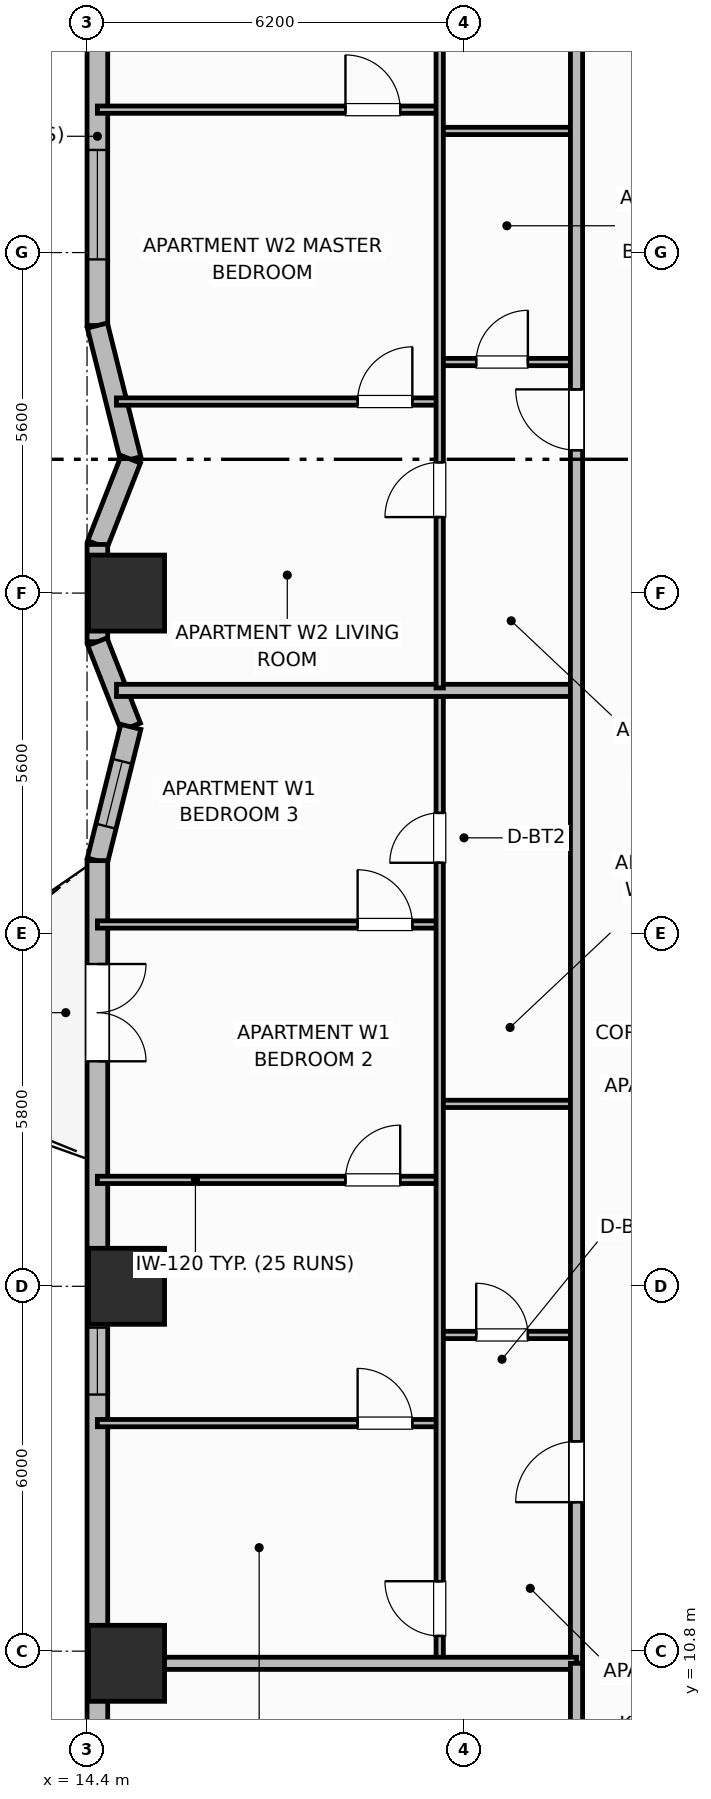
"""IFC4 building model, lengths in metres.
Left out: names, types, materials, properties, quantities, classifications, styles, units other than length and angle.
Written with IfcOpenShell. Run it as: python <this file> out.ifc"""

import sys

from ifc_helpers import new_model, si_unit, direction, frame, frame_2d, origin, origin_2d, place, context, subcontext, project, spatial, rectangle, extrude, element, fill, save


model = new_model("IFC4")
c1 = context("Model", 3, precision=1e-05, world=origin(), true_north=direction((0.0, 1.0)))
c2 = subcontext(c1, "Body", "Model", "MODEL_VIEW")
j1 = project(units=[si_unit("LENGTHUNIT", "METRE"), si_unit("PLANEANGLEUNIT", "RADIAN")], contexts=[c1])
p1 = place(None, origin())
s1 = spatial("IfcSite", under=j1, at=p1, CompositionType="ELEMENT")
p2 = place(p1, origin())
s2 = spatial("IfcBuilding", under=s1, at=p2, CompositionType="ELEMENT")
p3 = place(p2, frame((0.0, 0.0, 28.8)))
s3 = spatial("IfcBuildingStorey", under=s2, at=p3, CompositionType="ELEMENT", Elevation=28.8)
for number, where, z_axis, x_axis in (
    (1, (15.05, 10.6, 0.0), (0.0, 0.0, 1.0), (1.0, 0.0, 0.0)),
    (2, (15.05, 16.8, 0.0), (0.0, 0.0, 1.0), (1.0, 0.0, 0.0)),
    (3, (15.05, 28.2, 0.0), (0.0, 0.0, 1.0), (1.0, 0.0, 0.0)),
):
    element("IfcColumn", number, at=place(p3, frame(where, z_axis=z_axis, x_axis=x_axis)), inside=s3, PredefinedType="COLUMN", context=c2, shape_type="SweptSolid", body=[
        extrude(rectangle(XDim=1.25, YDim=1.25, at=origin_2d()), origin(), (0.0, 0.0, 1.0), 3.7),
    ])
p4 = place(p3, frame((14.57, 47.4, 0.0), z_axis=(0.0, 0.0, 1.0), x_axis=(0.0, -1.0, 0.0)))
e4 = element("IfcWall", 4, at=p4, inside=s3, PredefinedType="SOLIDWALL", context=c2, shape_type="SweptSolid", body=[
    extrude(rectangle(XDim=14.8, YDim=0.34, at=frame_2d((7.4, 0.0))), origin(), (0.0, 0.0, 1.0), 2.7),
])
p5 = place(p4, frame((3.762, 0.0, 0.73)))
e5 = element("IfcOpeningElement", 5, at=p5, cuts=e4, PredefinedType="OPENING", context=c2, shape_type="SweptSolid", body=[
    extrude(rectangle(XDim=1.8, YDim=1.85, at=frame_2d((0.9, 0.925))), frame((0.0, 0.18, 0.0), z_axis=(0.0, -1.0, 0.0), x_axis=(1.0, 0.0, 0.0)), (0.0, 0.0, 1.0), 0.36),
])
p6 = place(p4, frame((8.48, 0.0, 0.69)))
e6 = element("IfcOpeningElement", 6, at=p6, cuts=e4, PredefinedType="OPENING", context=c2, shape_type="SweptSolid", body=[
    extrude(rectangle(XDim=1.4, YDim=1.85, at=frame_2d((0.7, 0.925))), frame((0.0, 0.18, 0.0), z_axis=(0.0, -1.0, 0.0), x_axis=(1.0, 0.0, 0.0)), (0.0, 0.0, 1.0), 0.36),
])
p7 = place(p4, frame((11.913, 0.0, 0.73)))
e7 = element("IfcOpeningElement", 7, at=p7, cuts=e4, PredefinedType="OPENING", context=c2, shape_type="SweptSolid", body=[
    extrude(rectangle(XDim=1.8, YDim=1.85, at=frame_2d((0.9, 0.925))), frame((0.0, 0.18, 0.0), z_axis=(0.0, -1.0, 0.0), x_axis=(1.0, 0.0, 0.0)), (0.0, 0.0, 1.0), 0.36),
])
p8 = place(p3, frame((14.57, 32.6, 0.0), z_axis=(0.0, 0.0, 1.0), x_axis=(0.242535625036, -0.970142500145, 0.0)))
e8 = element("IfcWall", 8, at=p8, inside=s3, PredefinedType="SOLIDWALL", context=c2, shape_type="SweptSolid", body=[
    extrude(rectangle(XDim=2.268, YDim=0.34, at=frame_2d((1.134, 0.0))), origin(), (0.0, 0.0, 1.0), 2.7),
])
p9 = place(p3, frame((15.12, 30.4, 0.0), z_axis=(0.0, 0.0, 1.0), x_axis=(-0.365702591843, -0.930731762818, 0.0)))
e9 = element("IfcWall", 9, at=p9, inside=s3, PredefinedType="SOLIDWALL", context=c2, shape_type="SweptSolid", body=[
    extrude(rectangle(XDim=1.504, YDim=0.34, at=frame_2d((0.752, 0.0))), origin(), (0.0, 0.0, 1.0), 2.7),
])
p10 = place(p3, frame((14.57, 29.0, 0.0), z_axis=(0.0, 0.0, 1.0), x_axis=(0.0, -1.0, 0.0)))
e10 = element("IfcWall", 10, at=p10, inside=s3, PredefinedType="SOLIDWALL", context=c2, shape_type="SweptSolid", body=[
    extrude(rectangle(XDim=1.6, YDim=0.34, at=frame_2d((0.8, 0.0))), origin(), (0.0, 0.0, 1.0), 2.7),
])
p11 = place(p3, frame((14.57, 27.4, 0.0), z_axis=(0.0, 0.0, 1.0), x_axis=(0.365702591843, -0.930731762818, 0.0)))
e11 = element("IfcWall", 11, at=p11, inside=s3, PredefinedType="SOLIDWALL", context=c2, shape_type="SweptSolid", body=[
    extrude(rectangle(XDim=1.504, YDim=0.34, at=frame_2d((0.752, 0.0))), origin(), (0.0, 0.0, 1.0), 2.7),
])
p12 = place(p3, frame((15.12, 26.0, 0.0), z_axis=(0.0, 0.0, 1.0), x_axis=(-0.242560957029, -0.970136166796, 0.0)))
e12 = element("IfcWall", 12, at=p12, inside=s3, PredefinedType="SOLIDWALL", context=c2, shape_type="SweptSolid", body=[
    extrude(rectangle(XDim=2.268, YDim=0.34, at=frame_2d((1.134, 0.0))), origin(), (0.0, 0.0, 1.0), 2.7),
])
p13 = place(p12, frame((0.584, 0.0, 0.89)))
e13 = element("IfcOpeningElement", 13, at=p13, cuts=e12, PredefinedType="OPENING", context=c2, shape_type="SweptSolid", body=[
    extrude(rectangle(XDim=1.1, YDim=1.65, at=frame_2d((0.55, 0.825))), frame((0.0, 0.18, 0.0), z_axis=(0.0, -1.0, 0.0), x_axis=(1.0, 0.0, 0.0)), (0.0, 0.0, 1.0), 0.36),
])
p14 = place(p3, frame((14.57, 23.8, 0.0), z_axis=(0.0, 0.0, 1.0), x_axis=(0.0, -1.0, 0.0)))
e14 = element("IfcWall", 14, at=p14, inside=s3, PredefinedType="SOLIDWALL", context=c2, shape_type="SweptSolid", body=[
    extrude(rectangle(XDim=14.8, YDim=0.34, at=frame_2d((7.4, 0.0))), origin(), (0.0, 0.0, 1.0), 2.7),
])
p15 = place(p14, frame((1.7, 0.0, 0.0)))
e15 = element("IfcOpeningElement", 15, at=p15, cuts=e14, PredefinedType="OPENING", context=c2, shape_type="SweptSolid", body=[
    extrude(rectangle(XDim=1.6, YDim=2.1, at=frame_2d((0.8, 1.05))), frame((0.0, 0.18, 0.0), z_axis=(0.0, -1.0, 0.0), x_axis=(1.0, 0.0, 0.0)), (0.0, 0.0, 1.0), 0.36),
])
p16 = place(p14, frame((7.68, 0.0, 0.89)))
e16 = element("IfcOpeningElement", 16, at=p16, cuts=e14, PredefinedType="OPENING", context=c2, shape_type="SweptSolid", body=[
    extrude(rectangle(XDim=1.1, YDim=1.65, at=frame_2d((0.55, 0.825))), frame((0.0, 0.18, 0.0), z_axis=(0.0, -1.0, 0.0), x_axis=(1.0, 0.0, 0.0)), (0.0, 0.0, 1.0), 0.36),
])
p17 = place(p3, frame((20.2, 16.0, 0.0), z_axis=(0.0, 0.0, 1.0), x_axis=(1.0, 0.0, 0.0)))
e17 = element("IfcWall", 17, at=p17, inside=s3, PredefinedType="PARTITIONING", context=c2, shape_type="SweptSolid", body=[
    extrude(rectangle(XDim=2.25, YDim=0.12, at=frame_2d((1.125, 0.0))), origin(), (0.0, 0.0, 1.0), 2.53),
])
p18 = place(p17, frame((0.6, 0.0, 0.0)))
e18 = element("IfcOpeningElement", 18, at=p18, cuts=e17, PredefinedType="OPENING", context=c2, shape_type="SweptSolid", body=[
    extrude(rectangle(XDim=0.85, YDim=2.1, at=frame_2d((0.425, 1.05))), frame((0.0, 0.07, 0.0), z_axis=(0.0, -1.0, 0.0), x_axis=(1.0, 0.0, 0.0)), (0.0, 0.0, 1.0), 0.14),
])
p19 = place(p3, frame((20.2, 19.8, 0.0), z_axis=(0.0, 0.0, 1.0), x_axis=(1.0, 0.0, 0.0)))
e19 = element("IfcWall", 19, at=p19, inside=s3, PredefinedType="PARTITIONING", context=c2, shape_type="SweptSolid", body=[
    extrude(rectangle(XDim=2.25, YDim=0.12, at=frame_2d((1.125, 0.0))), origin(), (0.0, 0.0, 1.0), 2.53),
])
p20 = place(p3, frame((14.57, 14.55, 0.0), z_axis=(0.0, 0.0, 1.0), x_axis=(1.0, 0.0, 0.0)))
e20 = element("IfcWall", 20, at=p20, inside=s3, PredefinedType="PARTITIONING", context=c2, shape_type="SweptSolid", body=[
    extrude(rectangle(XDim=5.63, YDim=0.12, at=frame_2d((2.815, 0.0))), origin(), (0.0, 0.0, 1.0), 2.53),
])
p21 = place(p20, frame((4.28, 0.0, 0.0)))
e21 = element("IfcOpeningElement", 21, at=p21, cuts=e20, PredefinedType="OPENING", context=c2, shape_type="SweptSolid", body=[
    extrude(rectangle(XDim=0.9, YDim=2.1, at=frame_2d((0.45, 1.05))), frame((0.0, 0.07, 0.0), z_axis=(0.0, -1.0, 0.0), x_axis=(1.0, 0.0, 0.0)), (0.0, 0.0, 1.0), 0.14),
])
p22 = place(p3, frame((14.57, 18.55, 0.0), z_axis=(0.0, 0.0, 1.0), x_axis=(1.0, 0.0, 0.0)))
e22 = element("IfcWall", 22, at=p22, inside=s3, PredefinedType="PARTITIONING", context=c2, shape_type="SweptSolid", body=[
    extrude(rectangle(XDim=5.63, YDim=0.12, at=frame_2d((2.815, 0.0))), origin(), (0.0, 0.0, 1.0), 2.53),
])
p23 = place(p22, frame((4.08, 0.0, 0.0)))
e23 = element("IfcOpeningElement", 23, at=p23, cuts=e22, PredefinedType="OPENING", context=c2, shape_type="SweptSolid", body=[
    extrude(rectangle(XDim=0.9, YDim=2.1, at=frame_2d((0.45, 1.05))), frame((0.0, 0.07, 0.0), z_axis=(0.0, -1.0, 0.0), x_axis=(1.0, 0.0, 0.0)), (0.0, 0.0, 1.0), 0.14),
])
p24 = place(p3, frame((14.57, 22.75, 0.0), z_axis=(0.0, 0.0, 1.0), x_axis=(1.0, 0.0, 0.0)))
e24 = element("IfcWall", 24, at=p24, inside=s3, PredefinedType="PARTITIONING", context=c2, shape_type="SweptSolid", body=[
    extrude(rectangle(XDim=5.63, YDim=0.12, at=frame_2d((2.815, 0.0))), origin(), (0.0, 0.0, 1.0), 2.53),
])
p25 = place(p24, frame((4.28, 0.0, 0.0)))
e25 = element("IfcOpeningElement", 25, at=p25, cuts=e24, PredefinedType="OPENING", context=c2, shape_type="SweptSolid", body=[
    extrude(rectangle(XDim=0.9, YDim=2.1, at=frame_2d((0.45, 1.05))), frame((0.0, 0.07, 0.0), z_axis=(0.0, -1.0, 0.0), x_axis=(1.0, 0.0, 0.0)), (0.0, 0.0, 1.0), 0.14),
])
p26 = place(p3, frame((20.2, 10.64, 0.0), z_axis=(0.0, 0.0, 1.0), x_axis=(0.0, 1.0, 0.0)))
e26 = element("IfcWall", 26, at=p26, inside=s3, PredefinedType="PARTITIONING", context=c2, shape_type="SweptSolid", body=[
    extrude(rectangle(XDim=15.92, YDim=0.12, at=frame_2d((7.96, 0.0))), origin(), (0.0, 0.0, 1.0), 2.53),
])
p27 = place(p26, frame((0.41, 0.0, 0.0)))
e27 = element("IfcOpeningElement", 27, at=p27, cuts=e26, PredefinedType="OPENING", context=c2, shape_type="SweptSolid", body=[
    extrude(rectangle(XDim=0.9, YDim=2.1, at=frame_2d((0.45, 1.05))), frame((0.0, 0.07, 0.0), z_axis=(0.0, -1.0, 0.0), x_axis=(1.0, 0.0, 0.0)), (0.0, 0.0, 1.0), 0.14),
])
p28 = place(p26, frame((13.125, 0.0, 0.0)))
e28 = element("IfcOpeningElement", 28, at=p28, cuts=e26, PredefinedType="OPENING", context=c2, shape_type="SweptSolid", body=[
    extrude(rectangle(XDim=0.82, YDim=2.08, at=frame_2d((0.41, 1.04))), frame((0.0, 0.07, 0.0), z_axis=(0.0, -1.0, 0.0), x_axis=(1.0, 0.0, 0.0)), (0.0, 0.0, 1.0), 0.14),
])
p29 = place(p3, frame((14.884, 26.6, 0.0), z_axis=(0.0, 0.0, 1.0), x_axis=(1.0, 0.0, 0.0)))
e29 = element("IfcWall", 29, at=p29, inside=s3, PredefinedType="PARTITIONING", context=c2, shape_type="SweptSolid", body=[
    extrude(rectangle(XDim=7.566, YDim=0.2, at=frame_2d((3.783, 0.0))), origin(), (0.0, 0.0, 1.0), 2.53),
])
p30 = place(p3, frame((20.2, 32.0, 0.0), z_axis=(0.0, 0.0, 1.0), x_axis=(1.0, 0.0, 0.0)))
e30 = element("IfcWall", 30, at=p30, inside=s3, PredefinedType="PARTITIONING", context=c2, shape_type="SweptSolid", body=[
    extrude(rectangle(XDim=2.25, YDim=0.12, at=frame_2d((1.125, 0.0))), origin(), (0.0, 0.0, 1.0), 2.53),
])
p31 = place(p30, frame((0.6, 0.0, 0.0)))
e31 = element("IfcOpeningElement", 31, at=p31, cuts=e30, PredefinedType="OPENING", context=c2, shape_type="SweptSolid", body=[
    extrude(rectangle(XDim=0.85, YDim=2.1, at=frame_2d((0.425, 1.05))), frame((0.0, 0.07, 0.0), z_axis=(0.0, -1.0, 0.0), x_axis=(1.0, 0.0, 0.0)), (0.0, 0.0, 1.0), 0.14),
])
p32 = place(p3, frame((20.2, 35.8, 0.0), z_axis=(0.0, 0.0, 1.0), x_axis=(1.0, 0.0, 0.0)))
e32 = element("IfcWall", 32, at=p32, inside=s3, PredefinedType="PARTITIONING", context=c2, shape_type="SweptSolid", body=[
    extrude(rectangle(XDim=2.25, YDim=0.12, at=frame_2d((1.125, 0.0))), origin(), (0.0, 0.0, 1.0), 2.53),
])
p33 = place(p3, frame((14.883, 31.35, 0.0), z_axis=(0.0, 0.0, 1.0), x_axis=(1.0, 0.0, 0.0)))
e33 = element("IfcWall", 33, at=p33, inside=s3, PredefinedType="PARTITIONING", context=c2, shape_type="SweptSolid", body=[
    extrude(rectangle(XDim=5.317, YDim=0.12, at=frame_2d((2.659, 0.0))), origin(), (0.0, 0.0, 1.0), 2.53),
])
p34 = place(p33, frame((3.968, 0.0, 0.0)))
e34 = element("IfcOpeningElement", 34, at=p34, cuts=e33, PredefinedType="OPENING", context=c2, shape_type="SweptSolid", body=[
    extrude(rectangle(XDim=0.9, YDim=2.1, at=frame_2d((0.45, 1.05))), frame((0.0, 0.07, 0.0), z_axis=(0.0, -1.0, 0.0), x_axis=(1.0, 0.0, 0.0)), (0.0, 0.0, 1.0), 0.14),
])
p35 = place(p3, frame((14.57, 36.15, 0.0), z_axis=(0.0, 0.0, 1.0), x_axis=(1.0, 0.0, 0.0)))
e35 = element("IfcWall", 35, at=p35, inside=s3, PredefinedType="PARTITIONING", context=c2, shape_type="SweptSolid", body=[
    extrude(rectangle(XDim=5.63, YDim=0.12, at=frame_2d((2.815, 0.0))), origin(), (0.0, 0.0, 1.0), 2.53),
])
p36 = place(p35, frame((4.08, 0.0, 0.0)))
e36 = element("IfcOpeningElement", 36, at=p36, cuts=e35, PredefinedType="OPENING", context=c2, shape_type="SweptSolid", body=[
    extrude(rectangle(XDim=0.9, YDim=2.1, at=frame_2d((0.45, 1.05))), frame((0.0, 0.07, 0.0), z_axis=(0.0, -1.0, 0.0), x_axis=(1.0, 0.0, 0.0)), (0.0, 0.0, 1.0), 0.14),
])
p37 = place(p3, frame((20.2, 26.64, 0.0), z_axis=(0.0, 0.0, 1.0), x_axis=(0.0, 1.0, 0.0)))
e37 = element("IfcWall", 37, at=p37, inside=s3, PredefinedType="PARTITIONING", context=c2, shape_type="SweptSolid", body=[
    extrude(rectangle(XDim=19.12, YDim=0.12, at=frame_2d((9.56, 0.0))), origin(), (0.0, 0.0, 1.0), 2.53),
])
p38 = place(p37, frame((2.81, 0.0, 0.0)))
e38 = element("IfcOpeningElement", 38, at=p38, cuts=e37, PredefinedType="OPENING", context=c2, shape_type="SweptSolid", body=[
    extrude(rectangle(XDim=0.9, YDim=2.1, at=frame_2d((0.45, 1.05))), frame((0.0, 0.07, 0.0), z_axis=(0.0, -1.0, 0.0), x_axis=(1.0, 0.0, 0.0)), (0.0, 0.0, 1.0), 0.14),
])
p39 = place(p37, frame((16.18, 0.0, 0.0)))
e39 = element("IfcOpeningElement", 39, at=p39, cuts=e37, PredefinedType="OPENING", context=c2, shape_type="SweptSolid", body=[
    extrude(rectangle(XDim=0.82, YDim=2.08, at=frame_2d((0.41, 1.04))), frame((0.0, 0.07, 0.0), z_axis=(0.0, -1.0, 0.0), x_axis=(1.0, 0.0, 0.0)), (0.0, 0.0, 1.0), 0.14),
])
p40 = place(p3, frame((22.45, 10.6, 0.0), z_axis=(0.0, 0.0, 1.0), x_axis=(0.0, 1.0, 0.0)))
e40 = element("IfcWall", 40, at=p40, inside=s3, PredefinedType="PARTITIONING", context=c2, shape_type="SweptSolid", body=[
    extrude(rectangle(XDim=35.2, YDim=0.2, at=frame_2d((17.6, 0.0))), origin(), (0.0, 0.0, 1.0), 2.53),
])
p41 = place(p40, frame((2.65, 0.0, 0.0)))
e41 = element("IfcOpeningElement", 41, at=p41, cuts=e40, PredefinedType="OPENING", context=c2, shape_type="SweptSolid", body=[
    extrude(rectangle(XDim=1.0, YDim=2.15, at=frame_2d((0.5, 1.075))), frame((0.0, 0.11, 0.0), z_axis=(0.0, -1.0, 0.0), x_axis=(1.0, 0.0, 0.0)), (0.0, 0.0, 1.0), 0.22),
])
p42 = place(p40, frame((19.95, 0.0, 0.0)))
e42 = element("IfcOpeningElement", 42, at=p42, cuts=e40, PredefinedType="OPENING", context=c2, shape_type="SweptSolid", body=[
    extrude(rectangle(XDim=1.0, YDim=2.15, at=frame_2d((0.5, 1.075))), frame((0.0, 0.11, 0.0), z_axis=(0.0, -1.0, 0.0), x_axis=(1.0, 0.0, 0.0)), (0.0, 0.0, 1.0), 0.22),
])
p43 = place(p3, frame((14.99, 10.6, 0.0), z_axis=(0.0, 0.0, 1.0), x_axis=(1.0, 0.0, 0.0)))
e43 = element("IfcWall", 43, at=p43, inside=s3, PredefinedType="PARTITIONING", context=c2, shape_type="SweptSolid", body=[
    extrude(rectangle(XDim=7.46, YDim=0.2, at=frame_2d((3.73, 0.0))), origin(), (0.0, 0.0, 1.0), 2.53),
])
p44 = place(p3, frame((22.45, 4.97, 0.0), z_axis=(0.0, 0.0, 1.0), x_axis=(0.0, 1.0, 0.0)))
e44 = element("IfcWall", 44, at=p44, inside=s3, PredefinedType="PARTITIONING", context=c2, shape_type="SweptSolid", body=[
    extrude(rectangle(XDim=5.63, YDim=0.2, at=frame_2d((2.815, 0.0))), origin(), (0.0, 0.0, 1.0), 2.53),
])
p45 = place(p7, origin())
e45 = element("IfcWindow", 45, at=p45, inside=s3, PartitioningType="SINGLE_PANEL", PredefinedType="WINDOW", context=c2, shape_type="SweptSolid", body=[
    extrude(rectangle(XDim=1.8, YDim=1.85, at=frame_2d((0.9, 0.925))), frame((0.0, 0.03, 0.0), z_axis=(0.0, -1.0, 0.0), x_axis=(1.0, 0.0, 0.0)), (0.0, 0.0, 1.0), 0.06),
])
fill(e7, e45)
p46 = place(p13, origin())
e46 = element("IfcWindow", 46, at=p46, inside=s3, PartitioningType="SINGLE_PANEL", PredefinedType="WINDOW", context=c2, shape_type="SweptSolid", body=[
    extrude(rectangle(XDim=1.1, YDim=1.65, at=frame_2d((0.55, 0.825))), frame((0.0, 0.03, 0.0), z_axis=(0.0, -1.0, 0.0), x_axis=(1.0, 0.0, 0.0)), (0.0, 0.0, 1.0), 0.06),
])
fill(e13, e46)
p47 = place(p15, origin())
e47 = element("IfcDoor", 47, at=p47, inside=s3, OperationType="DOUBLE_DOOR_SINGLE_SWING", PredefinedType="DOOR", context=c2, shape_type="SweptSolid", body=[
    extrude(rectangle(XDim=1.6, YDim=2.1, at=frame_2d((0.8, 1.05))), frame((0.0, 0.025, 0.0), z_axis=(0.0, -1.0, 0.0), x_axis=(1.0, 0.0, 0.0)), (0.0, 0.0, 1.0), 0.05),
])
fill(e15, e47)
p48 = place(p16, origin())
e48 = element("IfcWindow", 48, at=p48, inside=s3, PartitioningType="SINGLE_PANEL", PredefinedType="WINDOW", context=c2, shape_type="SweptSolid", body=[
    extrude(rectangle(XDim=1.1, YDim=1.65, at=frame_2d((0.55, 0.825))), frame((0.0, 0.03, 0.0), z_axis=(0.0, -1.0, 0.0), x_axis=(1.0, 0.0, 0.0)), (0.0, 0.0, 1.0), 0.06),
])
fill(e16, e48)
p49 = place(p18, origin())
e49 = element("IfcDoor", 49, at=p49, inside=s3, OperationType="SINGLE_SWING_LEFT", PredefinedType="DOOR", context=c2, shape_type="SweptSolid", body=[
    extrude(rectangle(XDim=0.85, YDim=2.1, at=frame_2d((0.425, 1.05))), frame((0.0, 0.025, 0.0), z_axis=(0.0, -1.0, 0.0), x_axis=(1.0, 0.0, 0.0)), (0.0, 0.0, 1.0), 0.05),
])
fill(e18, e49)
p50 = place(p21, origin())
e50 = element("IfcDoor", 50, at=p50, inside=s3, OperationType="SINGLE_SWING_LEFT", PredefinedType="DOOR", context=c2, shape_type="SweptSolid", body=[
    extrude(rectangle(XDim=0.9, YDim=2.1, at=frame_2d((0.45, 1.05))), frame((0.0, 0.025, 0.0), z_axis=(0.0, -1.0, 0.0), x_axis=(1.0, 0.0, 0.0)), (0.0, 0.0, 1.0), 0.05),
])
fill(e21, e50)
p51 = place(p23, origin())
e51 = element("IfcDoor", 51, at=p51, inside=s3, OperationType="SINGLE_SWING_RIGHT", PredefinedType="DOOR", context=c2, shape_type="SweptSolid", body=[
    extrude(rectangle(XDim=0.9, YDim=2.1, at=frame_2d((0.45, 1.05))), frame((0.0, 0.025, 0.0), z_axis=(0.0, -1.0, 0.0), x_axis=(1.0, 0.0, 0.0)), (0.0, 0.0, 1.0), 0.05),
])
fill(e23, e51)
p52 = place(p25, origin())
e52 = element("IfcDoor", 52, at=p52, inside=s3, OperationType="SINGLE_SWING_LEFT", PredefinedType="DOOR", context=c2, shape_type="SweptSolid", body=[
    extrude(rectangle(XDim=0.9, YDim=2.1, at=frame_2d((0.45, 1.05))), frame((0.0, 0.025, 0.0), z_axis=(0.0, -1.0, 0.0), x_axis=(1.0, 0.0, 0.0)), (0.0, 0.0, 1.0), 0.05),
])
fill(e25, e52)
p53 = place(p27, origin())
e53 = element("IfcDoor", 53, at=p53, inside=s3, OperationType="SINGLE_SWING_RIGHT", PredefinedType="DOOR", context=c2, shape_type="SweptSolid", body=[
    extrude(rectangle(XDim=0.9, YDim=2.1, at=frame_2d((0.45, 1.05))), frame((0.0, 0.025, 0.0), z_axis=(0.0, -1.0, 0.0), x_axis=(1.0, 0.0, 0.0)), (0.0, 0.0, 1.0), 0.05),
])
fill(e27, e53)
p54 = place(p28, origin())
e54 = element("IfcDoor", 54, at=p54, inside=s3, OperationType="SINGLE_SWING_LEFT", PredefinedType="DOOR", context=c2, shape_type="SweptSolid", body=[
    extrude(rectangle(XDim=0.82, YDim=2.08, at=frame_2d((0.41, 1.04))), frame((0.0, 0.025, 0.0), z_axis=(0.0, -1.0, 0.0), x_axis=(1.0, 0.0, 0.0)), (0.0, 0.0, 1.0), 0.05),
])
fill(e28, e54)
p55 = place(p31, origin())
e55 = element("IfcDoor", 55, at=p55, inside=s3, OperationType="SINGLE_SWING_RIGHT", PredefinedType="DOOR", context=c2, shape_type="SweptSolid", body=[
    extrude(rectangle(XDim=0.85, YDim=2.1, at=frame_2d((0.425, 1.05))), frame((0.0, 0.025, 0.0), z_axis=(0.0, -1.0, 0.0), x_axis=(1.0, 0.0, 0.0)), (0.0, 0.0, 1.0), 0.05),
])
fill(e31, e55)
p56 = place(p34, origin())
e56 = element("IfcDoor", 56, at=p56, inside=s3, OperationType="SINGLE_SWING_RIGHT", PredefinedType="DOOR", context=c2, shape_type="SweptSolid", body=[
    extrude(rectangle(XDim=0.9, YDim=2.1, at=frame_2d((0.45, 1.05))), frame((0.0, 0.025, 0.0), z_axis=(0.0, -1.0, 0.0), x_axis=(1.0, 0.0, 0.0)), (0.0, 0.0, 1.0), 0.05),
])
fill(e34, e56)
p57 = place(p36, origin())
e57 = element("IfcDoor", 57, at=p57, inside=s3, OperationType="SINGLE_SWING_LEFT", PredefinedType="DOOR", context=c2, shape_type="SweptSolid", body=[
    extrude(rectangle(XDim=0.9, YDim=2.1, at=frame_2d((0.45, 1.05))), frame((0.0, 0.025, 0.0), z_axis=(0.0, -1.0, 0.0), x_axis=(1.0, 0.0, 0.0)), (0.0, 0.0, 1.0), 0.05),
])
fill(e36, e57)
p58 = place(p38, origin())
e58 = element("IfcDoor", 58, at=p58, inside=s3, OperationType="SINGLE_SWING_LEFT", PredefinedType="DOOR", context=c2, shape_type="SweptSolid", body=[
    extrude(rectangle(XDim=0.9, YDim=2.1, at=frame_2d((0.45, 1.05))), frame((0.0, 0.025, 0.0), z_axis=(0.0, -1.0, 0.0), x_axis=(1.0, 0.0, 0.0)), (0.0, 0.0, 1.0), 0.05),
])
fill(e38, e58)
p59 = place(p41, origin())
e59 = element("IfcDoor", 59, at=p59, inside=s3, OperationType="SINGLE_SWING_LEFT", PredefinedType="DOOR", context=c2, shape_type="SweptSolid", body=[
    extrude(rectangle(XDim=1.0, YDim=2.15, at=frame_2d((0.5, 1.075))), frame((0.0, 0.025, 0.0), z_axis=(0.0, -1.0, 0.0), x_axis=(1.0, 0.0, 0.0)), (0.0, 0.0, 1.0), 0.05),
])
fill(e41, e59)
p60 = place(p42, origin())
e60 = element("IfcDoor", 60, at=p60, inside=s3, OperationType="SINGLE_SWING_RIGHT", PredefinedType="DOOR", context=c2, shape_type="SweptSolid", body=[
    extrude(rectangle(XDim=1.0, YDim=2.15, at=frame_2d((0.5, 1.075))), frame((0.0, 0.025, 0.0), z_axis=(0.0, -1.0, 0.0), x_axis=(1.0, 0.0, 0.0)), (0.0, 0.0, 1.0), 0.05),
])
fill(e42, e60)
save(model, sys.argv[1])
